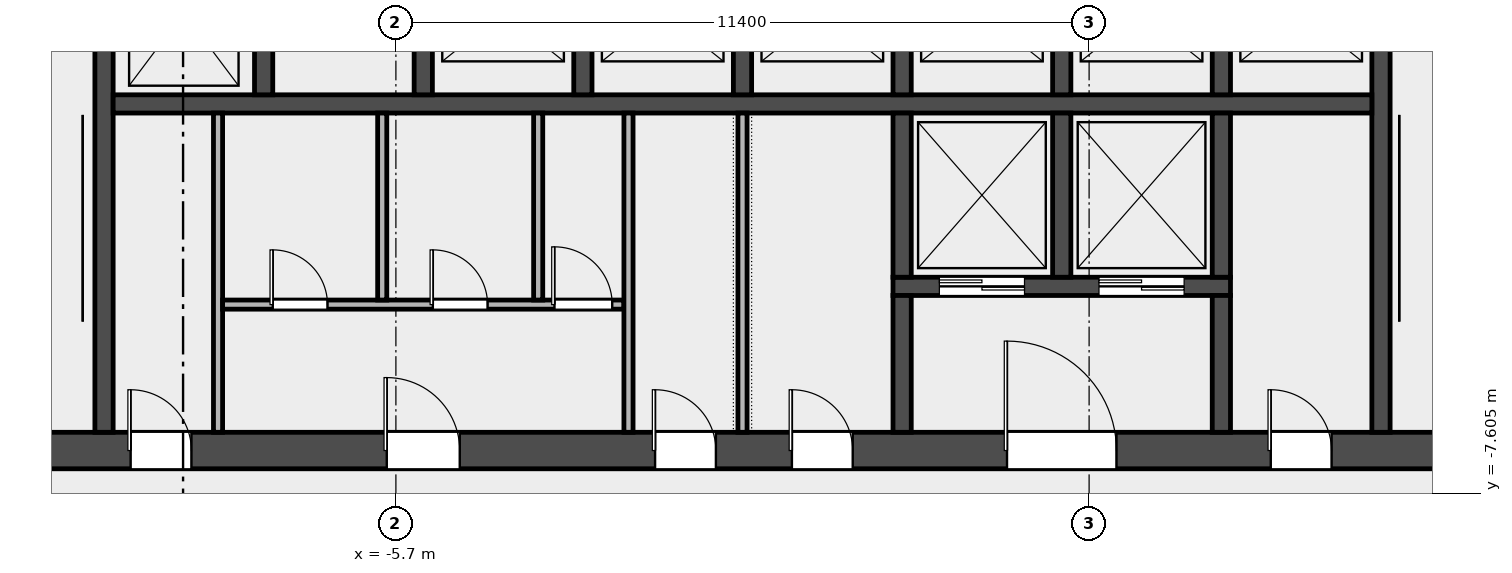
"""IFC4 building model, lengths in metres.
Left out: names, types, materials, properties, quantities, classifications, styles, units other than length and angle.
Written with IfcOpenShell. Run it as: python <this file> out.ifc"""

import sys

from ifc_helpers import new_model, si_unit, direction, frame, frame_2d, origin, place, context, subcontext, project, spatial, rectangle, extrude, element, fill, save


model = new_model("IFC4")
c1 = context("Model", 3, precision=1e-05, world=origin(), true_north=direction((0.0, 1.0)))
c2 = subcontext(c1, "Body", "Model", "MODEL_VIEW")
j1 = project(units=[si_unit("LENGTHUNIT", "METRE"), si_unit("PLANEANGLEUNIT", "RADIAN")], contexts=[c1])
p1 = place(None, origin())
s1 = spatial("IfcSite", under=j1, at=p1, CompositionType="ELEMENT")
p2 = place(p1, origin())
s2 = spatial("IfcBuilding", under=s1, at=p2, CompositionType="ELEMENT")
p3 = place(p2, origin())
s3 = spatial("IfcBuildingStorey", under=s2, at=p3, CompositionType="ELEMENT", Elevation=0.0)
p4 = place(p3, frame((-14.4, -6.9, 0.0), z_axis=(0.0, 0.0, 1.0), x_axis=(1.0, 0.0, 0.0)))
e1 = element("IfcWall", 1, at=p4, inside=s3, PredefinedType="SHEAR", context=c2, shape_type="SweptSolid", body=[
    extrude(rectangle(XDim=28.8, YDim=0.6, at=frame_2d((14.4, 0.0))), origin(), (0.0, 0.0, 1.0), 8.7),
])
p5 = place(p4, frame((4.337, 0.0, 0.0)))
e2 = element("IfcOpeningElement", 2, at=p5, cuts=e1, PredefinedType="OPENING", context=c2, shape_type="SweptSolid", body=[
    extrude(rectangle(XDim=1.0, YDim=2.1, at=frame_2d((0.5, 1.05))), frame((0.0, 0.312, 0.0), z_axis=(0.0, -1.0, 0.0), x_axis=(1.0, 0.0, 0.0)), (0.0, 0.0, 1.0), 0.624),
])
p6 = place(p4, frame((8.55, 0.0, 0.0)))
e3 = element("IfcOpeningElement", 3, at=p6, cuts=e1, PredefinedType="OPENING", context=c2, shape_type="SweptSolid", body=[
    extrude(rectangle(XDim=1.2, YDim=2.1, at=frame_2d((0.6, 1.05))), frame((0.0, 0.312, 0.0), z_axis=(0.0, -1.0, 0.0), x_axis=(1.0, 0.0, 0.0)), (0.0, 0.0, 1.0), 0.624),
])
p7 = place(p4, frame((12.962, 0.0, 0.0)))
e4 = element("IfcOpeningElement", 4, at=p7, cuts=e1, PredefinedType="OPENING", context=c2, shape_type="SweptSolid", body=[
    extrude(rectangle(XDim=1.0, YDim=2.1, at=frame_2d((0.5, 1.05))), frame((0.0, 0.312, 0.0), z_axis=(0.0, -1.0, 0.0), x_axis=(1.0, 0.0, 0.0)), (0.0, 0.0, 1.0), 0.624),
])
p8 = place(p4, frame((15.212, 0.0, 0.0)))
e5 = element("IfcOpeningElement", 5, at=p8, cuts=e1, PredefinedType="OPENING", context=c2, shape_type="SweptSolid", body=[
    extrude(rectangle(XDim=1.0, YDim=2.1, at=frame_2d((0.5, 1.05))), frame((0.0, 0.312, 0.0), z_axis=(0.0, -1.0, 0.0), x_axis=(1.0, 0.0, 0.0)), (0.0, 0.0, 1.0), 0.624),
])
p9 = place(p4, frame((18.75, 0.0, 0.0)))
e6 = element("IfcOpeningElement", 6, at=p9, cuts=e1, PredefinedType="OPENING", context=c2, shape_type="SweptSolid", body=[
    extrude(rectangle(XDim=1.8, YDim=2.1, at=frame_2d((0.9, 1.05))), frame((0.0, 0.312, 0.0), z_axis=(0.0, -1.0, 0.0), x_axis=(1.0, 0.0, 0.0)), (0.0, 0.0, 1.0), 0.624),
])
p10 = place(p4, frame((23.087, 0.0, 0.0)))
e7 = element("IfcOpeningElement", 7, at=p10, cuts=e1, PredefinedType="OPENING", context=c2, shape_type="SweptSolid", body=[
    extrude(rectangle(XDim=1.0, YDim=2.1, at=frame_2d((0.5, 1.05))), frame((0.0, 0.312, 0.0), z_axis=(0.0, -1.0, 0.0), x_axis=(1.0, 0.0, 0.0)), (0.0, 0.0, 1.0), 0.624),
])
for number, where, z_axis, x_axis in (
    (8, (-10.5, -6.6, 0.0), (0.0, 0.0, 1.0), (0.0, 1.0, 0.0)),
    (9, (10.5, -6.6, 0.0), (0.0, 0.0, 1.0), (0.0, 1.0, 0.0)),
):
    element("IfcWall", number, at=place(p3, frame(where, z_axis=z_axis, x_axis=x_axis)), inside=s3, PredefinedType="SHEAR", context=c2, shape_type="SweptSolid", body=[
        extrude(rectangle(XDim=8.55, YDim=0.3, at=frame_2d((4.275, 0.0))), origin(), (0.0, 0.0, 1.0), 8.7),
    ])
p11 = place(p3, frame((-10.35, -1.2, -1.8), z_axis=(0.0, 0.0, 1.0), x_axis=(1.0, 0.0, 0.0)))
e10 = element("IfcWall", 10, at=p11, inside=s3, PredefinedType="SOLIDWALL", context=c2, shape_type="SweptSolid", body=[
    extrude(rectangle(XDim=20.7, YDim=0.3, at=frame_2d((10.35, 0.0))), origin(), (0.0, 0.0, 1.0), 10.5),
])
for number, where, z_axis, x_axis in (
    (11, (-7.875, -1.05, -1.8), (0.0, 0.0, 1.0), (0.0, 1.0, 0.0)),
    (12, (-5.25, -1.05, -1.8), (0.0, 0.0, 1.0), (0.0, 1.0, 0.0)),
    (13, (-2.625, -1.05, -1.8), (0.0, 0.0, 1.0), (0.0, 1.0, 0.0)),
    (14, (0.0, -1.05, -1.8), (0.0, 0.0, 1.0), (0.0, 1.0, 0.0)),
    (15, (2.625, -1.05, -1.8), (0.0, 0.0, 1.0), (0.0, 1.0, 0.0)),
    (16, (5.25, -1.05, -1.8), (0.0, 0.0, 1.0), (0.0, 1.0, 0.0)),
    (17, (7.875, -1.05, -1.8), (0.0, 0.0, 1.0), (0.0, 1.0, 0.0)),
):
    element("IfcWall", number, at=place(p3, frame(where, z_axis=z_axis, x_axis=x_axis)), inside=s3, PredefinedType="SOLIDWALL", context=c2, shape_type="SweptSolid", body=[
        extrude(rectangle(XDim=2.7, YDim=0.3, at=frame_2d((1.35, 0.0))), origin(), (0.0, 0.0, 1.0), 10.5),
    ])
p12 = place(p3, frame((2.475, -4.2, -1.8), z_axis=(0.0, 0.0, 1.0), x_axis=(1.0, 0.0, 0.0)))
e18 = element("IfcWall", 18, at=p12, inside=s3, PredefinedType="SOLIDWALL", context=c2, shape_type="SweptSolid", body=[
    extrude(rectangle(XDim=5.55, YDim=0.3, at=frame_2d((2.775, 0.0))), origin(), (0.0, 0.0, 1.0), 10.5),
])
p13 = place(p12, frame((0.762, 0.0, 1.8)))
e19 = element("IfcOpeningElement", 19, at=p13, cuts=e18, PredefinedType="OPENING", context=c2, shape_type="SweptSolid", body=[
    extrude(rectangle(XDim=1.4, YDim=2.1, at=frame_2d((0.7, 1.05))), frame((0.0, 0.162, 0.0), z_axis=(0.0, -1.0, 0.0), x_axis=(1.0, 0.0, 0.0)), (0.0, 0.0, 1.0), 0.324),
])
p14 = place(p12, frame((3.387, 0.0, 1.8)))
e20 = element("IfcOpeningElement", 20, at=p14, cuts=e18, PredefinedType="OPENING", context=c2, shape_type="SweptSolid", body=[
    extrude(rectangle(XDim=1.4, YDim=2.1, at=frame_2d((0.7, 1.05))), frame((0.0, 0.162, 0.0), z_axis=(0.0, -1.0, 0.0), x_axis=(1.0, 0.0, 0.0)), (0.0, 0.0, 1.0), 0.324),
])
p15 = place(p3, frame((2.625, -4.05, -1.8), z_axis=(0.0, 0.0, 1.0), x_axis=(0.0, 1.0, 0.0)))
e21 = element("IfcWall", 21, at=p15, inside=s3, PredefinedType="SOLIDWALL", context=c2, shape_type="SweptSolid", body=[
    extrude(rectangle(XDim=2.7, YDim=0.3, at=frame_2d((1.35, 0.0))), origin(), (0.0, 0.0, 1.0), 10.5),
])
p16 = place(p3, frame((2.625, -6.6, 0.0), z_axis=(0.0, 0.0, 1.0), x_axis=(0.0, 1.0, 0.0)))
e22 = element("IfcWall", 22, at=p16, inside=s3, PredefinedType="SOLIDWALL", context=c2, shape_type="SweptSolid", body=[
    extrude(rectangle(XDim=2.25, YDim=0.3, at=frame_2d((1.125, 0.0))), origin(), (0.0, 0.0, 1.0), 8.7),
])
for number, where, z_axis, x_axis in (
    (23, (5.25, -4.05, -1.8), (0.0, 0.0, 1.0), (0.0, 1.0, 0.0)),
    (24, (7.875, -4.05, -1.8), (0.0, 0.0, 1.0), (0.0, 1.0, 0.0)),
):
    element("IfcWall", number, at=place(p3, frame(where, z_axis=z_axis, x_axis=x_axis)), inside=s3, PredefinedType="SOLIDWALL", context=c2, shape_type="SweptSolid", body=[
        extrude(rectangle(XDim=2.7, YDim=0.3, at=frame_2d((1.35, 0.0))), origin(), (0.0, 0.0, 1.0), 10.5),
    ])
p17 = place(p3, frame((7.875, -6.6, 0.0), z_axis=(0.0, 0.0, 1.0), x_axis=(0.0, 1.0, 0.0)))
e25 = element("IfcWall", 25, at=p17, inside=s3, PredefinedType="SOLIDWALL", context=c2, shape_type="SweptSolid", body=[
    extrude(rectangle(XDim=2.25, YDim=0.3, at=frame_2d((1.125, 0.0))), origin(), (0.0, 0.0, 1.0), 8.7),
])
p18 = place(p3, frame((-8.625, -6.6, 0.0), z_axis=(0.0, 0.0, 1.0), x_axis=(0.0, 1.0, 0.0)))
e26 = element("IfcWall", 26, at=p18, inside=s3, PredefinedType="PARTITIONING", context=c2, shape_type="SweptSolid", body=[
    extrude(rectangle(XDim=5.25, YDim=0.15, at=frame_2d((2.625, 0.0))), origin(), (0.0, 0.0, 1.0), 8.7),
])
p19 = place(p3, frame((-8.55, -4.5, 0.0), z_axis=(0.0, 0.0, 1.0), x_axis=(1.0, 0.0, 0.0)))
e27 = element("IfcWall", 27, at=p19, inside=s3, PredefinedType="PARTITIONING", context=c2, shape_type="SweptSolid", body=[
    extrude(rectangle(XDim=6.6, YDim=0.15, at=frame_2d((3.3, 0.0))), origin(), (0.0, 0.0, 1.0), 8.7),
])
p20 = place(p19, frame((0.825, 0.0, 0.0)))
e28 = element("IfcOpeningElement", 28, at=p20, cuts=e27, PredefinedType="OPENING", context=c2, shape_type="SweptSolid", body=[
    extrude(rectangle(XDim=0.9, YDim=2.1, at=frame_2d((0.45, 1.05))), frame((0.0, 0.087, 0.0), z_axis=(0.0, -1.0, 0.0), x_axis=(1.0, 0.0, 0.0)), (0.0, 0.0, 1.0), 0.174),
])
p21 = place(p19, frame((3.458, 0.0, 0.0)))
e29 = element("IfcOpeningElement", 29, at=p21, cuts=e27, PredefinedType="OPENING", context=c2, shape_type="SweptSolid", body=[
    extrude(rectangle(XDim=0.9, YDim=2.1, at=frame_2d((0.45, 1.05))), frame((0.0, 0.087, 0.0), z_axis=(0.0, -1.0, 0.0), x_axis=(1.0, 0.0, 0.0)), (0.0, 0.0, 1.0), 0.174),
])
p22 = place(p19, frame((5.458, 0.0, 0.0)))
e30 = element("IfcOpeningElement", 30, at=p22, cuts=e27, PredefinedType="OPENING", context=c2, shape_type="SweptSolid", body=[
    extrude(rectangle(XDim=0.95, YDim=2.1, at=frame_2d((0.475, 1.05))), frame((0.0, 0.087, 0.0), z_axis=(0.0, -1.0, 0.0), x_axis=(1.0, 0.0, 0.0)), (0.0, 0.0, 1.0), 0.174),
])
for number, where, z_axis, x_axis in (
    (31, (-5.925, -4.425, 0.0), (0.0, 0.0, 1.0), (0.0, 1.0, 0.0)),
    (32, (-3.36, -4.425, 0.0), (0.0, 0.0, 1.0), (0.0, 1.0, 0.0)),
):
    element("IfcWall", number, at=place(p3, frame(where, z_axis=z_axis, x_axis=x_axis)), inside=s3, PredefinedType="PARTITIONING", context=c2, shape_type="SweptSolid", body=[
        extrude(rectangle(XDim=3.075, YDim=0.15, at=frame_2d((1.538, 0.0))), origin(), (0.0, 0.0, 1.0), 8.7),
    ])
for number, where, z_axis, x_axis in (
    (33, (-1.875, -6.6, 0.0), (0.0, 0.0, 1.0), (0.0, 1.0, 0.0)),
    (34, (0.0, -6.6, 0.0), (0.0, 0.0, 1.0), (0.0, 1.0, 0.0)),
):
    element("IfcWall", number, at=place(p3, frame(where, z_axis=z_axis, x_axis=x_axis)), inside=s3, PredefinedType="PARTITIONING", context=c2, shape_type="SweptSolid", body=[
        extrude(rectangle(XDim=5.25, YDim=0.15, at=frame_2d((2.625, 0.0))), origin(), (0.0, 0.0, 1.0), 8.7),
    ])
p23 = place(p13, origin())
e35 = element("IfcDoor", 35, at=p23, inside=s3, OperationType="DOUBLE_DOOR_SLIDING", PredefinedType="DOOR", context=c2, shape_type="SweptSolid", body=[
    extrude(rectangle(XDim=1.4, YDim=2.1, at=frame_2d((0.7, 1.05))), frame((0.0, 0.025, 0.0), z_axis=(0.0, -1.0, 0.0), x_axis=(1.0, 0.0, 0.0)), (0.0, 0.0, 1.0), 0.05),
])
fill(e19, e35)
p24 = place(p14, origin())
e36 = element("IfcDoor", 36, at=p24, inside=s3, OperationType="DOUBLE_DOOR_SLIDING", PredefinedType="DOOR", context=c2, shape_type="SweptSolid", body=[
    extrude(rectangle(XDim=1.4, YDim=2.1, at=frame_2d((0.7, 1.05))), frame((0.0, 0.025, 0.0), z_axis=(0.0, -1.0, 0.0), x_axis=(1.0, 0.0, 0.0)), (0.0, 0.0, 1.0), 0.05),
])
fill(e20, e36)
p25 = place(p5, origin())
e37 = element("IfcDoor", 37, at=p25, inside=s3, OperationType="SINGLE_SWING_LEFT", PredefinedType="DOOR", context=c2, shape_type="SweptSolid", body=[
    extrude(rectangle(XDim=1.0, YDim=2.1, at=frame_2d((0.5, 1.05))), frame((0.0, 0.025, 0.0), z_axis=(0.0, -1.0, 0.0), x_axis=(1.0, 0.0, 0.0)), (0.0, 0.0, 1.0), 0.05),
])
fill(e2, e37)
p26 = place(p6, origin())
e38 = element("IfcDoor", 38, at=p26, inside=s3, OperationType="SINGLE_SWING_LEFT", PredefinedType="DOOR", context=c2, shape_type="SweptSolid", body=[
    extrude(rectangle(XDim=1.2, YDim=2.1, at=frame_2d((0.6, 1.05))), frame((0.0, 0.025, 0.0), z_axis=(0.0, -1.0, 0.0), x_axis=(1.0, 0.0, 0.0)), (0.0, 0.0, 1.0), 0.05),
])
fill(e3, e38)
p27 = place(p20, origin())
e39 = element("IfcDoor", 39, at=p27, inside=s3, OperationType="SINGLE_SWING_LEFT", PredefinedType="DOOR", context=c2, shape_type="SweptSolid", body=[
    extrude(rectangle(XDim=0.9, YDim=2.1, at=frame_2d((0.45, 1.05))), frame((0.0, 0.025, 0.0), z_axis=(0.0, -1.0, 0.0), x_axis=(1.0, 0.0, 0.0)), (0.0, 0.0, 1.0), 0.05),
])
fill(e28, e39)
p28 = place(p21, origin())
e40 = element("IfcDoor", 40, at=p28, inside=s3, OperationType="SINGLE_SWING_LEFT", PredefinedType="DOOR", context=c2, shape_type="SweptSolid", body=[
    extrude(rectangle(XDim=0.9, YDim=2.1, at=frame_2d((0.45, 1.05))), frame((0.0, 0.025, 0.0), z_axis=(0.0, -1.0, 0.0), x_axis=(1.0, 0.0, 0.0)), (0.0, 0.0, 1.0), 0.05),
])
fill(e29, e40)
p29 = place(p22, origin())
e41 = element("IfcDoor", 41, at=p29, inside=s3, OperationType="SINGLE_SWING_LEFT", PredefinedType="DOOR", context=c2, shape_type="SweptSolid", body=[
    extrude(rectangle(XDim=0.95, YDim=2.1, at=frame_2d((0.475, 1.05))), frame((0.0, 0.025, 0.0), z_axis=(0.0, -1.0, 0.0), x_axis=(1.0, 0.0, 0.0)), (0.0, 0.0, 1.0), 0.05),
])
fill(e30, e41)
p30 = place(p7, origin())
e42 = element("IfcDoor", 42, at=p30, inside=s3, OperationType="SINGLE_SWING_LEFT", PredefinedType="DOOR", context=c2, shape_type="SweptSolid", body=[
    extrude(rectangle(XDim=1.0, YDim=2.1, at=frame_2d((0.5, 1.05))), frame((0.0, 0.025, 0.0), z_axis=(0.0, -1.0, 0.0), x_axis=(1.0, 0.0, 0.0)), (0.0, 0.0, 1.0), 0.05),
])
fill(e4, e42)
p31 = place(p8, origin())
e43 = element("IfcDoor", 43, at=p31, inside=s3, OperationType="SINGLE_SWING_LEFT", PredefinedType="DOOR", context=c2, shape_type="SweptSolid", body=[
    extrude(rectangle(XDim=1.0, YDim=2.1, at=frame_2d((0.5, 1.05))), frame((0.0, 0.025, 0.0), z_axis=(0.0, -1.0, 0.0), x_axis=(1.0, 0.0, 0.0)), (0.0, 0.0, 1.0), 0.05),
])
fill(e5, e43)
p32 = place(p9, origin())
e44 = element("IfcDoor", 44, at=p32, inside=s3, OperationType="DOUBLE_DOOR_SINGLE_SWING", PredefinedType="DOOR", context=c2, shape_type="SweptSolid", body=[
    extrude(rectangle(XDim=1.8, YDim=2.1, at=frame_2d((0.9, 1.05))), frame((0.0, 0.025, 0.0), z_axis=(0.0, -1.0, 0.0), x_axis=(1.0, 0.0, 0.0)), (0.0, 0.0, 1.0), 0.05),
])
fill(e6, e44)
p33 = place(p10, origin())
e45 = element("IfcDoor", 45, at=p33, inside=s3, OperationType="SINGLE_SWING_LEFT", PredefinedType="DOOR", context=c2, shape_type="SweptSolid", body=[
    extrude(rectangle(XDim=1.0, YDim=2.1, at=frame_2d((0.5, 1.05))), frame((0.0, 0.025, 0.0), z_axis=(0.0, -1.0, 0.0), x_axis=(1.0, 0.0, 0.0)), (0.0, 0.0, 1.0), 0.05),
])
fill(e7, e45)
save(model, sys.argv[1])
